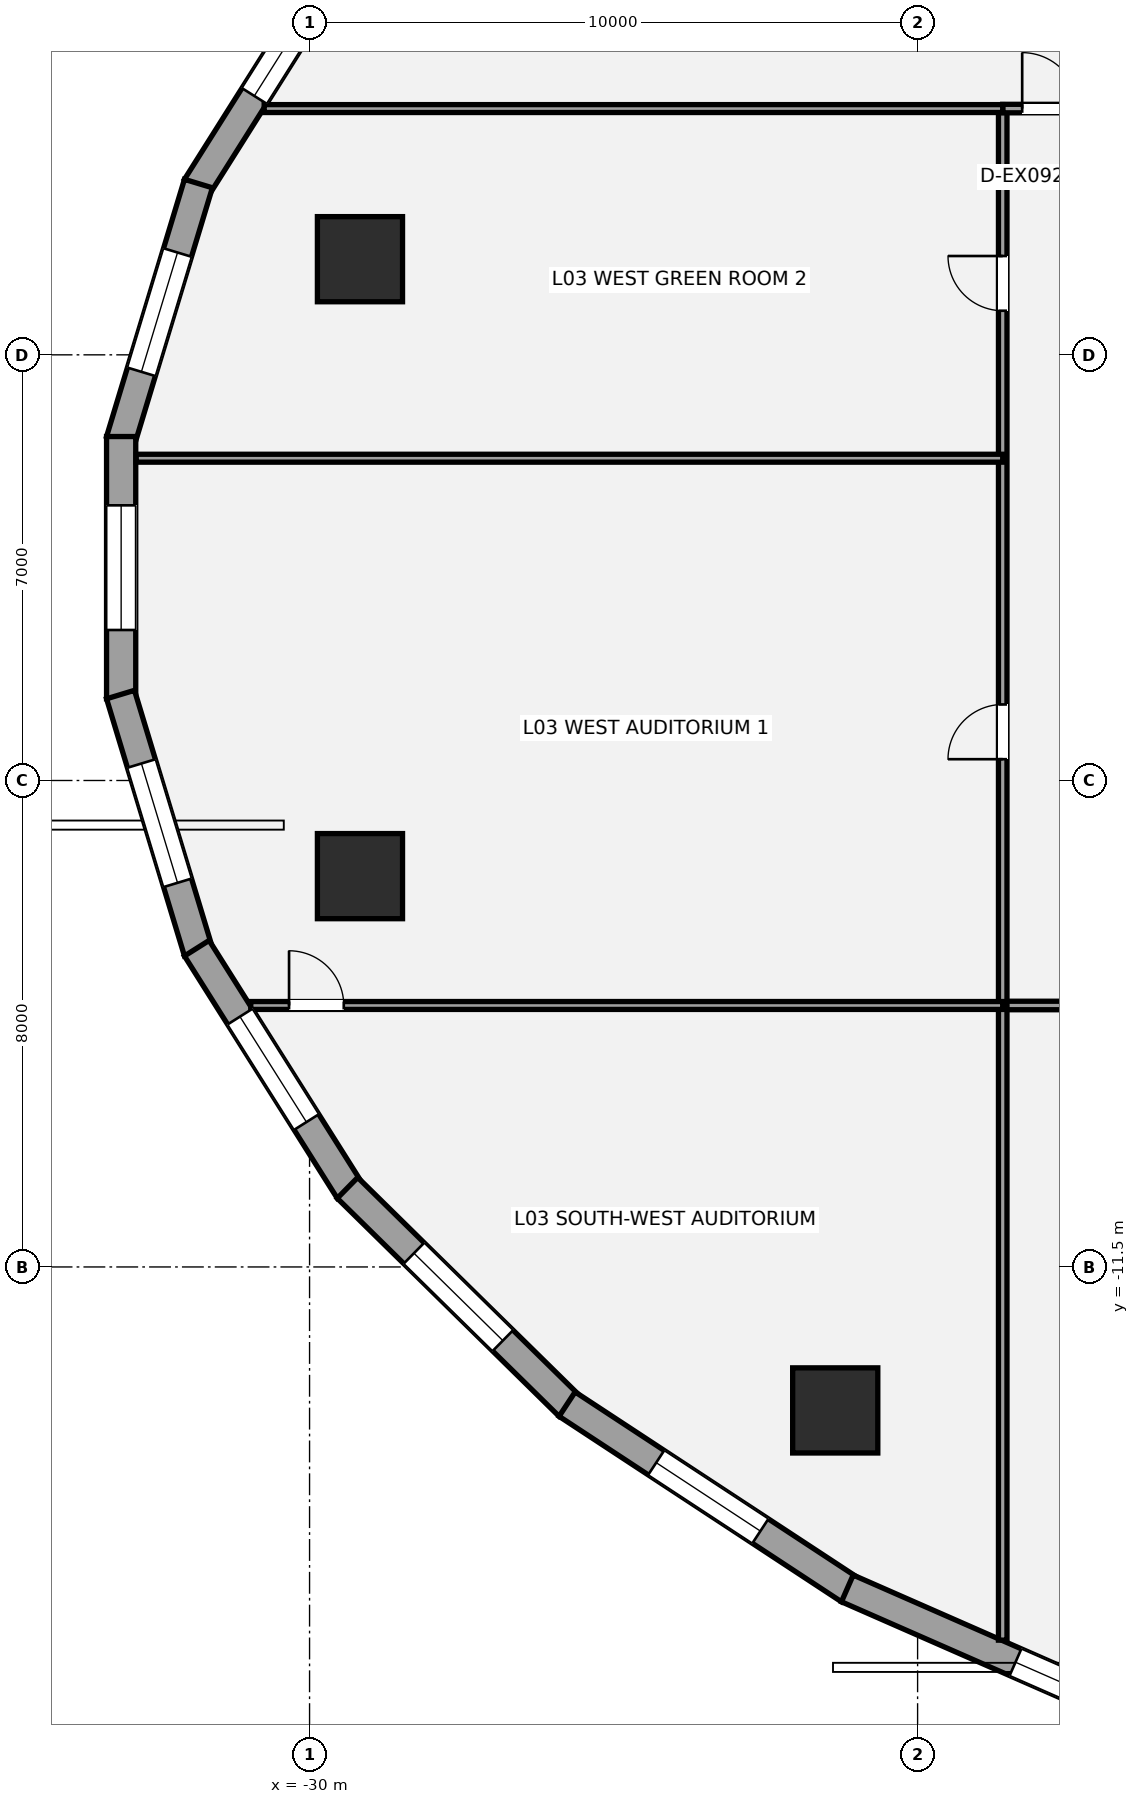
"""IFC4 building model, lengths in metres.
Left out: names, types, materials, properties, quantities, classifications, styles, units other than length and angle.
Written with IfcOpenShell. Run it as: python <this file> out.ifc"""

import sys

from ifc_helpers import new_model, si_unit, direction, frame, frame_2d, origin, origin_2d, place, context, subcontext, project, spatial, rectangle, hollow_circle, extrude, element, fill, save


model = new_model("IFC4")
c1 = context("Model", 3, precision=1e-05, world=origin(), true_north=direction((0.0, 1.0)))
c2 = subcontext(c1, "Body", "Model", "MODEL_VIEW")
j1 = project(units=[si_unit("LENGTHUNIT", "METRE"), si_unit("PLANEANGLEUNIT", "RADIAN")], contexts=[c1])
p1 = place(None, origin())
s1 = spatial("IfcSite", under=j1, at=p1, CompositionType="ELEMENT")
p2 = place(p1, origin())
s2 = spatial("IfcBuilding", under=s1, at=p2, CompositionType="ELEMENT")
p3 = place(p2, frame((0.0, 0.0, 14.4)))
s3 = spatial("IfcBuildingStorey", under=s2, at=p3, CompositionType="ELEMENT", Elevation=14.4)
for number, where, z_axis, x_axis in (
    (1, (-29.171, 5.073, 0.0), (0.0, 0.0, 1.0), (1.0, 0.0, 0.0)),
    (2, (-29.171, -5.073, 0.0), (0.0, 0.0, 1.0), (1.0, 0.0, 0.0)),
    (3, (-21.354, -13.859, 0.0), (0.0, 0.0, 1.0), (1.0, 0.0, 0.0)),
):
    element("IfcColumn", number, at=place(p3, frame(where, z_axis=z_axis, x_axis=x_axis)), inside=s3, PredefinedType="USERDEFINED", context=c2, shape_type="SweptSolid", body=[
        extrude(hollow_circle(Radius=0.7, WallThickness=0.05, at=origin_2d()), origin(), (0.0, 0.0, 1.0), 4.2),
    ])
p4 = place(p3, frame((-31.854, 6.258, 0.0), z_axis=(0.0, 0.0, 1.0), x_axis=(0.53349762721, 0.845801561693, 0.0)))
e4 = element("IfcWall", 4, at=p4, inside=s3, PredefinedType="STANDARD", context=c2, shape_type="SweptSolid", body=[
    extrude(rectangle(XDim=4.711, YDim=0.48, at=frame_2d((2.355, 0.0))), origin(), (0.0, 0.0, 1.0), 3.109),
])
p5 = place(p4, frame((1.773, 0.0, 0.72)))
e5 = element("IfcOpeningElement", 5, at=p5, cuts=e4, PredefinedType="OPENING", context=c2, shape_type="SweptSolid", body=[
    extrude(rectangle(XDim=2.05, YDim=1.8, at=frame_2d((1.025, 0.9))), frame((0.0, 0.25, 0.0), z_axis=(0.0, -1.0, 0.0), x_axis=(1.0, 0.0, 0.0)), (0.0, 0.0, 1.0), 0.5),
])
p6 = place(p3, frame((-33.109, 2.087, 0.0), z_axis=(0.0, 0.0, 1.0), x_axis=(0.289855603468, 0.957070388811, 0.0)))
e6 = element("IfcWall", 6, at=p6, inside=s3, PredefinedType="STANDARD", context=c2, shape_type="SweptSolid", body=[
    extrude(rectangle(XDim=4.419, YDim=0.48, at=frame_2d((2.21, 0.0))), origin(), (0.0, 0.0, 1.0), 3.109),
])
p7 = place(p6, frame((1.185, 0.0, 0.72)))
e7 = element("IfcOpeningElement", 7, at=p7, cuts=e6, PredefinedType="OPENING", context=c2, shape_type="SweptSolid", body=[
    extrude(rectangle(XDim=2.05, YDim=1.8, at=frame_2d((1.025, 0.9))), frame((0.0, 0.25, 0.0), z_axis=(0.0, -1.0, 0.0), x_axis=(1.0, 0.0, 0.0)), (0.0, 0.0, 1.0), 0.5),
])
p8 = place(p3, frame((-33.099, -2.156, 0.0), z_axis=(0.0, 0.0, 1.0), x_axis=(0.0, 1.0, 0.0)))
e8 = element("IfcWall", 8, at=p8, inside=s3, PredefinedType="STANDARD", context=c2, shape_type="SweptSolid", body=[
    extrude(rectangle(XDim=4.313, YDim=0.48, at=frame_2d((2.156, 0.0))), origin(), (0.0, 0.0, 1.0), 3.109),
])
p9 = place(p8, frame((1.131, 0.0, 0.72)))
e9 = element("IfcOpeningElement", 9, at=p9, cuts=e8, PredefinedType="OPENING", context=c2, shape_type="SweptSolid", body=[
    extrude(rectangle(XDim=2.05, YDim=1.8, at=frame_2d((1.025, 0.9))), frame((0.0, 0.25, 0.0), z_axis=(0.0, -1.0, 0.0), x_axis=(1.0, 0.0, 0.0)), (0.0, 0.0, 1.0), 0.5),
])
p10 = place(p3, frame((-31.828, -6.317, 0.0), z_axis=(0.0, 0.0, 1.0), x_axis=(-0.289855603468, 0.957070388811, 0.0)))
e10 = element("IfcWall", 10, at=p10, inside=s3, PredefinedType="STANDARD", context=c2, shape_type="SweptSolid", body=[
    extrude(rectangle(XDim=4.419, YDim=0.48, at=frame_2d((2.21, 0.0))), origin(), (0.0, 0.0, 1.0), 3.109),
])
p11 = place(p10, frame((1.185, 0.0, 0.72)))
e11 = element("IfcOpeningElement", 11, at=p11, cuts=e10, PredefinedType="OPENING", context=c2, shape_type="SweptSolid", body=[
    extrude(rectangle(XDim=2.05, YDim=1.8, at=frame_2d((1.025, 0.9))), frame((0.0, 0.25, 0.0), z_axis=(0.0, -1.0, 0.0), x_axis=(1.0, 0.0, 0.0)), (0.0, 0.0, 1.0), 0.5),
])
p12 = place(p3, frame((-29.341, -10.243, 0.0), z_axis=(0.0, 0.0, 1.0), x_axis=(-0.53349762721, 0.845801561693, 0.0)))
e12 = element("IfcWall", 12, at=p12, inside=s3, PredefinedType="STANDARD", context=c2, shape_type="SweptSolid", body=[
    extrude(rectangle(XDim=4.711, YDim=0.48, at=frame_2d((2.355, 0.0))), origin(), (0.0, 0.0, 1.0), 3.109),
])
p13 = place(p12, frame((1.33, 0.0, 0.72)))
e13 = element("IfcOpeningElement", 13, at=p13, cuts=e12, PredefinedType="OPENING", context=c2, shape_type="SweptSolid", body=[
    extrude(rectangle(XDim=2.05, YDim=1.8, at=frame_2d((1.025, 0.9))), frame((0.0, 0.25, 0.0), z_axis=(0.0, -1.0, 0.0), x_axis=(1.0, 0.0, 0.0)), (0.0, 0.0, 1.0), 0.5),
])
p14 = place(p3, frame((-25.728, -13.785, 0.0), z_axis=(0.0, 0.0, 1.0), x_axis=(-0.713189080178, 0.700971708355, 0.0)))
e14 = element("IfcWall", 14, at=p14, inside=s3, PredefinedType="STANDARD", context=c2, shape_type="SweptSolid", body=[
    extrude(rectangle(XDim=5.116, YDim=0.48, at=frame_2d((2.558, 0.0))), origin(), (0.0, 0.0, 1.0), 3.109),
])
p15 = place(p14, frame((1.533, 0.0, 0.72)))
e15 = element("IfcOpeningElement", 15, at=p15, cuts=e14, PredefinedType="OPENING", context=c2, shape_type="SweptSolid", body=[
    extrude(rectangle(XDim=2.05, YDim=1.8, at=frame_2d((1.025, 0.9))), frame((0.0, 0.25, 0.0), z_axis=(0.0, -1.0, 0.0), x_axis=(1.0, 0.0, 0.0)), (0.0, 0.0, 1.0), 0.5),
])
p16 = place(p3, frame((-21.121, -16.806, 0.0), z_axis=(0.0, 0.0, 1.0), x_axis=(-0.835863918172, 0.548936708827, 0.0)))
e16 = element("IfcWall", 16, at=p16, inside=s3, PredefinedType="STANDARD", context=c2, shape_type="SweptSolid", body=[
    extrude(rectangle(XDim=5.555, YDim=0.48, at=frame_2d((2.778, 0.0))), origin(), (0.0, 0.0, 1.0), 3.109),
])
p17 = place(p16, frame((1.753, 0.0, 0.72)))
e17 = element("IfcOpeningElement", 17, at=p17, cuts=e16, PredefinedType="OPENING", context=c2, shape_type="SweptSolid", body=[
    extrude(rectangle(XDim=2.05, YDim=1.8, at=frame_2d((1.025, 0.9))), frame((0.0, 0.25, 0.0), z_axis=(0.0, -1.0, 0.0), x_axis=(1.0, 0.0, 0.0)), (0.0, 0.0, 1.0), 0.5),
])
p18 = place(p3, frame((-15.695, -19.183, 0.0), z_axis=(0.0, 0.0, 1.0), x_axis=(-0.91570760638, 0.401845218484, 0.0)))
e18 = element("IfcWall", 18, at=p18, inside=s3, PredefinedType="STANDARD", context=c2, shape_type="SweptSolid", body=[
    extrude(rectangle(XDim=5.963, YDim=0.48, at=frame_2d((2.981, 0.0))), origin(), (0.0, 0.0, 1.0), 3.109),
])
p19 = place(p18, frame((0.893, 0.0, 0.72)))
e19 = element("IfcOpeningElement", 19, at=p19, cuts=e18, PredefinedType="OPENING", context=c2, shape_type="SweptSolid", body=[
    extrude(rectangle(XDim=2.05, YDim=1.8, at=frame_2d((1.025, 0.9))), frame((0.0, 0.25, 0.0), z_axis=(0.0, -1.0, 0.0), x_axis=(1.0, 0.0, 0.0)), (0.0, 0.0, 1.0), 0.5),
])
p20 = place(p3, frame((-18.6, -7.2, 0.0), z_axis=(0.0, 0.0, 1.0), x_axis=(1.0, 0.0, 0.0)))
e20 = element("IfcWall", 20, at=p20, inside=s3, PredefinedType="PARTITIONING", context=c2, shape_type="SweptSolid", body=[
    extrude(rectangle(XDim=34.6, YDim=0.14, at=frame_2d((17.3, 0.0))), origin(), (0.0, 0.0, 1.0), 3.98),
])
p21 = place(p20, frame((3.6, 0.0, 0.0)))
e21 = element("IfcOpeningElement", 21, at=p21, cuts=e20, PredefinedType="OPENING", context=c2, shape_type="SweptSolid", body=[
    extrude(rectangle(XDim=0.9, YDim=2.1, at=frame_2d((0.45, 1.05))), frame((0.0, 0.08, 0.0), z_axis=(0.0, -1.0, 0.0), x_axis=(1.0, 0.0, 0.0)), (0.0, 0.0, 1.0), 0.16),
])
p22 = place(p20, frame((12.15, 0.0, 0.0)))
e22 = element("IfcOpeningElement", 22, at=p22, cuts=e20, PredefinedType="OPENING", context=c2, shape_type="SweptSolid", body=[
    extrude(rectangle(XDim=0.9, YDim=2.1, at=frame_2d((0.45, 1.05))), frame((0.0, 0.08, 0.0), z_axis=(0.0, -1.0, 0.0), x_axis=(1.0, 0.0, 0.0)), (0.0, 0.0, 1.0), 0.16),
])
p23 = place(p20, frame((20.8, 0.0, 0.0)))
e23 = element("IfcOpeningElement", 23, at=p23, cuts=e20, PredefinedType="OPENING", context=c2, shape_type="SweptSolid", body=[
    extrude(rectangle(XDim=0.9, YDim=2.1, at=frame_2d((0.45, 1.05))), frame((0.0, 0.08, 0.0), z_axis=(0.0, -1.0, 0.0), x_axis=(1.0, 0.0, 0.0)), (0.0, 0.0, 1.0), 0.16),
])
p24 = place(p20, frame((29.55, 0.0, 0.0)))
e24 = element("IfcOpeningElement", 24, at=p24, cuts=e20, PredefinedType="OPENING", context=c2, shape_type="SweptSolid", body=[
    extrude(rectangle(XDim=0.9, YDim=2.1, at=frame_2d((0.45, 1.05))), frame((0.0, 0.08, 0.0), z_axis=(0.0, -1.0, 0.0), x_axis=(1.0, 0.0, 0.0)), (0.0, 0.0, 1.0), 0.16),
])
p25 = place(p3, frame((-18.6, -17.637, 0.0), z_axis=(0.0, 0.0, 1.0), x_axis=(0.0, 1.0, 0.0)))
e25 = element("IfcWall", 25, at=p25, inside=s3, PredefinedType="PARTITIONING", context=c2, shape_type="SweptSolid", body=[
    extrude(rectangle(XDim=25.187, YDim=0.14, at=frame_2d((12.594, 0.0))), origin(), (0.0, 0.0, 1.0), 3.348),
])
p26 = place(p25, frame((14.487, 0.0, 0.0)))
e26 = element("IfcOpeningElement", 26, at=p26, cuts=e25, PredefinedType="OPENING", context=c2, shape_type="SweptSolid", body=[
    extrude(rectangle(XDim=0.9, YDim=2.1, at=frame_2d((0.45, 1.05))), frame((0.0, 0.08, 0.0), z_axis=(0.0, -1.0, 0.0), x_axis=(1.0, 0.0, 0.0)), (0.0, 0.0, 1.0), 0.16),
])
p27 = place(p25, frame((21.862, 0.0, 0.0)))
e27 = element("IfcOpeningElement", 27, at=p27, cuts=e25, PredefinedType="OPENING", context=c2, shape_type="SweptSolid", body=[
    extrude(rectangle(XDim=0.9, YDim=2.1, at=frame_2d((0.45, 1.05))), frame((0.0, 0.08, 0.0), z_axis=(0.0, -1.0, 0.0), x_axis=(1.0, 0.0, 0.0)), (0.0, 0.0, 1.0), 0.16),
])
p28 = place(p3, frame((-18.6, 7.55, 0.0), z_axis=(0.0, 0.0, 1.0), x_axis=(1.0, 0.0, 0.0)))
e28 = element("IfcWall", 28, at=p28, inside=s3, PredefinedType="PARTITIONING", context=c2, shape_type="SweptSolid", body=[
    extrude(rectangle(XDim=4.55, YDim=0.14, at=frame_2d((2.275, 0.0))), origin(), (0.0, 0.0, 1.0), 3.433),
])
p29 = place(p28, frame((0.32, 0.0, 0.0)))
e29 = element("IfcOpeningElement", 29, at=p29, cuts=e28, PredefinedType="OPENING", context=c2, shape_type="SweptSolid", body=[
    extrude(rectangle(XDim=0.92, YDim=2.15, at=frame_2d((0.46, 1.075))), frame((0.0, 0.08, 0.0), z_axis=(0.0, -1.0, 0.0), x_axis=(1.0, 0.0, 0.0)), (0.0, 0.0, 1.0), 0.16),
])
p30 = place(p3, frame((-30.747, 7.55, 0.0), z_axis=(0.0, 0.0, 1.0), x_axis=(1.0, 0.0, 0.0)))
e30 = element("IfcWall", 30, at=p30, inside=s3, PredefinedType="PARTITIONING", context=c2, shape_type="SweptSolid", body=[
    extrude(rectangle(XDim=12.146, YDim=0.13, at=frame_2d((6.073, 0.0))), origin(), (0.0, 0.0, 1.0), 2.958),
])
p31 = place(p3, frame((-30.967, -7.2, 0.0), z_axis=(0.0, 0.0, 1.0), x_axis=(1.0, 0.0, 0.0)))
e31 = element("IfcWall", 31, at=p31, inside=s3, PredefinedType="PARTITIONING", context=c2, shape_type="SweptSolid", body=[
    extrude(rectangle(XDim=12.367, YDim=0.13, at=frame_2d((6.184, 0.0))), origin(), (0.0, 0.0, 1.0), 2.958),
])
p32 = place(p31, frame((0.63, 0.0, 0.0)))
e32 = element("IfcOpeningElement", 32, at=p32, cuts=e31, PredefinedType="OPENING", context=c2, shape_type="SweptSolid", body=[
    extrude(rectangle(XDim=0.9, YDim=2.1, at=frame_2d((0.45, 1.05))), frame((0.0, 0.075, 0.0), z_axis=(0.0, -1.0, 0.0), x_axis=(1.0, 0.0, 0.0)), (0.0, 0.0, 1.0), 0.15),
])
p33 = place(p3, frame((-32.851, 1.8, 0.0), z_axis=(0.0, 0.0, 1.0), x_axis=(1.0, 0.0, 0.0)))
e33 = element("IfcWall", 33, at=p33, inside=s3, PredefinedType="PARTITIONING", context=c2, shape_type="SweptSolid", body=[
    extrude(rectangle(XDim=14.25, YDim=0.13, at=frame_2d((7.125, 0.0))), origin(), (0.0, 0.0, 1.0), 3.433),
])
p34 = place(p5, origin())
e34 = element("IfcWindow", 34, at=p34, inside=s3, PartitioningType="SINGLE_PANEL", PredefinedType="WINDOW", context=c2, shape_type="SweptSolid", body=[
    extrude(rectangle(XDim=2.05, YDim=1.8, at=frame_2d((1.025, 0.9))), frame((0.0, -0.01, 0.0), z_axis=(0.0, -1.0, 0.0), x_axis=(1.0, 0.0, 0.0)), (0.0, 0.0, 1.0), 0.06),
])
fill(e5, e34)
p35 = place(p7, origin())
e35 = element("IfcWindow", 35, at=p35, inside=s3, PartitioningType="SINGLE_PANEL", PredefinedType="WINDOW", context=c2, shape_type="SweptSolid", body=[
    extrude(rectangle(XDim=2.05, YDim=1.8, at=frame_2d((1.025, 0.9))), frame((0.0, -0.01, 0.0), z_axis=(0.0, -1.0, 0.0), x_axis=(1.0, 0.0, 0.0)), (0.0, 0.0, 1.0), 0.06),
])
fill(e7, e35)
p36 = place(p9, origin())
e36 = element("IfcWindow", 36, at=p36, inside=s3, PartitioningType="SINGLE_PANEL", PredefinedType="WINDOW", context=c2, shape_type="SweptSolid", body=[
    extrude(rectangle(XDim=2.05, YDim=1.8, at=frame_2d((1.025, 0.9))), frame((0.0, -0.01, 0.0), z_axis=(0.0, -1.0, 0.0), x_axis=(1.0, 0.0, 0.0)), (0.0, 0.0, 1.0), 0.06),
])
fill(e9, e36)
p37 = place(p11, origin())
e37 = element("IfcWindow", 37, at=p37, inside=s3, PartitioningType="SINGLE_PANEL", PredefinedType="WINDOW", context=c2, shape_type="SweptSolid", body=[
    extrude(rectangle(XDim=2.05, YDim=1.8, at=frame_2d((1.025, 0.9))), frame((0.0, -0.01, 0.0), z_axis=(0.0, -1.0, 0.0), x_axis=(1.0, 0.0, 0.0)), (0.0, 0.0, 1.0), 0.06),
])
fill(e11, e37)
p38 = place(p13, origin())
e38 = element("IfcWindow", 38, at=p38, inside=s3, PartitioningType="SINGLE_PANEL", PredefinedType="WINDOW", context=c2, shape_type="SweptSolid", body=[
    extrude(rectangle(XDim=2.05, YDim=1.8, at=frame_2d((1.025, 0.9))), frame((0.0, -0.01, 0.0), z_axis=(0.0, -1.0, 0.0), x_axis=(1.0, 0.0, 0.0)), (0.0, 0.0, 1.0), 0.06),
])
fill(e13, e38)
p39 = place(p15, origin())
e39 = element("IfcWindow", 39, at=p39, inside=s3, PartitioningType="SINGLE_PANEL", PredefinedType="WINDOW", context=c2, shape_type="SweptSolid", body=[
    extrude(rectangle(XDim=2.05, YDim=1.8, at=frame_2d((1.025, 0.9))), frame((0.0, -0.01, 0.0), z_axis=(0.0, -1.0, 0.0), x_axis=(1.0, 0.0, 0.0)), (0.0, 0.0, 1.0), 0.06),
])
fill(e15, e39)
p40 = place(p17, origin())
e40 = element("IfcWindow", 40, at=p40, inside=s3, PartitioningType="SINGLE_PANEL", PredefinedType="WINDOW", context=c2, shape_type="SweptSolid", body=[
    extrude(rectangle(XDim=2.05, YDim=1.8, at=frame_2d((1.025, 0.9))), frame((0.0, -0.01, 0.0), z_axis=(0.0, -1.0, 0.0), x_axis=(1.0, 0.0, 0.0)), (0.0, 0.0, 1.0), 0.06),
])
fill(e17, e40)
p41 = place(p19, origin())
e41 = element("IfcWindow", 41, at=p41, inside=s3, PartitioningType="SINGLE_PANEL", PredefinedType="WINDOW", context=c2, shape_type="SweptSolid", body=[
    extrude(rectangle(XDim=2.05, YDim=1.8, at=frame_2d((1.025, 0.9))), frame((0.0, -0.01, 0.0), z_axis=(0.0, -1.0, 0.0), x_axis=(1.0, 0.0, 0.0)), (0.0, 0.0, 1.0), 0.06),
])
fill(e19, e41)
p42 = place(p29, origin())
e42 = element("IfcDoor", 42, at=p42, inside=s3, OperationType="SINGLE_SWING_LEFT", PredefinedType="DOOR", context=c2, shape_type="SweptSolid", body=[
    extrude(rectangle(XDim=0.92, YDim=2.15, at=frame_2d((0.46, 1.075))), frame((0.0, 0.025, 0.0), z_axis=(0.0, -1.0, 0.0), x_axis=(1.0, 0.0, 0.0)), (0.0, 0.0, 1.0), 0.05),
])
fill(e29, e42)
p43 = place(p32, origin())
e43 = element("IfcDoor", 43, at=p43, inside=s3, OperationType="SINGLE_SWING_LEFT", PredefinedType="DOOR", context=c2, shape_type="SweptSolid", body=[
    extrude(rectangle(XDim=0.9, YDim=2.1, at=frame_2d((0.45, 1.05))), frame((0.0, 0.025, 0.0), z_axis=(0.0, -1.0, 0.0), x_axis=(1.0, 0.0, 0.0)), (0.0, 0.0, 1.0), 0.05),
])
fill(e32, e43)
p44 = place(p26, origin())
e44 = element("IfcDoor", 44, at=p44, inside=s3, OperationType="SINGLE_SWING_LEFT", PredefinedType="DOOR", context=c2, shape_type="SweptSolid", body=[
    extrude(rectangle(XDim=0.9, YDim=2.1, at=frame_2d((0.45, 1.05))), frame((0.0, 0.025, 0.0), z_axis=(0.0, -1.0, 0.0), x_axis=(1.0, 0.0, 0.0)), (0.0, 0.0, 1.0), 0.05),
])
fill(e26, e44)
p45 = place(p27, origin())
e45 = element("IfcDoor", 45, at=p45, inside=s3, OperationType="SINGLE_SWING_RIGHT", PredefinedType="DOOR", context=c2, shape_type="SweptSolid", body=[
    extrude(rectangle(XDim=0.9, YDim=2.1, at=frame_2d((0.45, 1.05))), frame((0.0, 0.025, 0.0), z_axis=(0.0, -1.0, 0.0), x_axis=(1.0, 0.0, 0.0)), (0.0, 0.0, 1.0), 0.05),
])
fill(e27, e45)
save(model, sys.argv[1])
